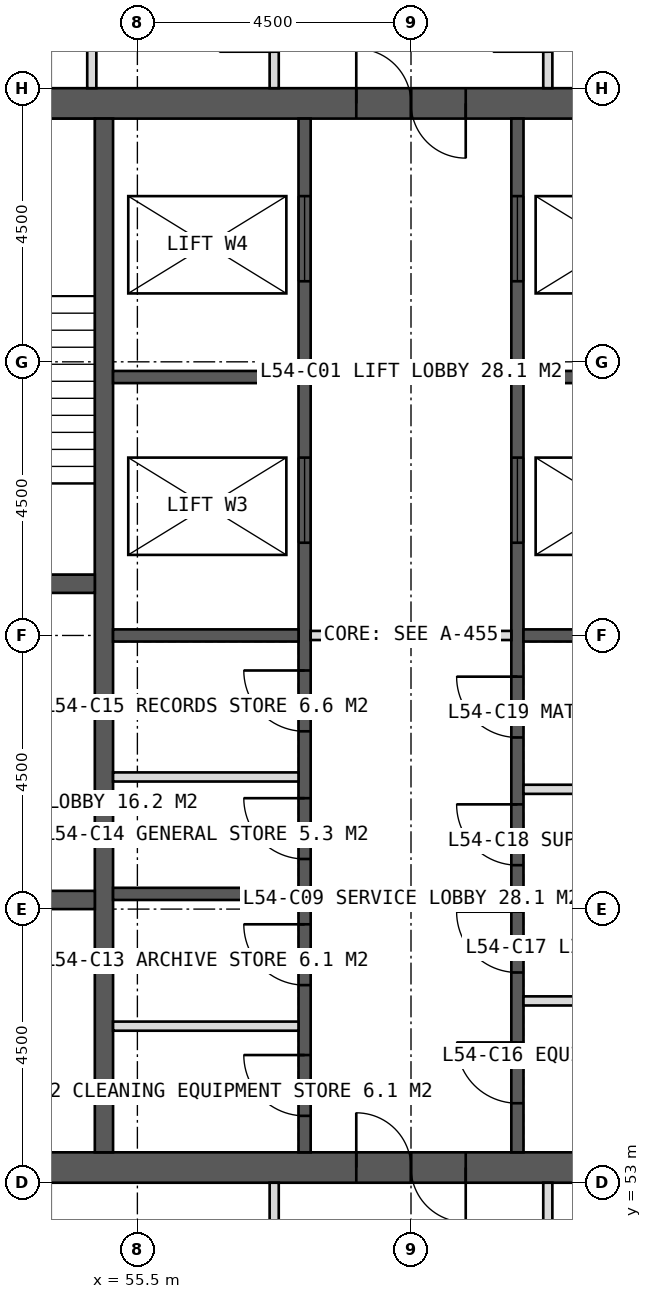
"""IFC4 building model, lengths in metres.
Left out: names, types, materials, properties, quantities, classifications, styles, units other than length and angle.
Written with IfcOpenShell. Run it as: python <this file> out.ifc"""

import sys

from ifc_helpers import new_model, si_unit, direction, frame, frame_2d, origin, place, context, subcontext, project, spatial, rectangle, extrude, element, fill, save


model = new_model("IFC4")
c1 = context("Model", 3, precision=1e-05, world=origin(), true_north=direction((0.0, 1.0)))
c2 = subcontext(c1, "Body", "Model", "MODEL_VIEW")
j1 = project(units=[si_unit("LENGTHUNIT", "METRE"), si_unit("PLANEANGLEUNIT", "RADIAN")], contexts=[c1])
p1 = place(None, origin())
s1 = spatial("IfcSite", under=j1, at=p1, CompositionType="ELEMENT")
p2 = place(p1, origin())
s2 = spatial("IfcBuilding", under=s1, at=p2, CompositionType="ELEMENT")
p3 = place(p2, frame((0.0, 0.0, 225.0)))
s3 = spatial("IfcBuildingStorey", under=s2, at=p3, CompositionType="ELEMENT", Elevation=225.0)
p4 = place(p3, frame((51.0, 70.75, 0.0), z_axis=(0.0, 0.0, 1.0), x_axis=(1.0, 0.0, 0.0)))
e1 = element("IfcWall", 1, at=p4, inside=s3, PredefinedType="SHEAR", context=c2, shape_type="SweptSolid", body=[
    extrude(rectangle(XDim=18.0, YDim=0.5, at=frame_2d((9.0, 0.0))), origin(), (0.0, 0.0, 1.0), 4.0),
])
p5 = place(p4, frame((8.1, 0.0, 0.0)))
e2 = element("IfcOpeningElement", 2, at=p5, cuts=e1, PredefinedType="OPENING", context=c2, shape_type="SweptSolid", body=[
    extrude(rectangle(XDim=1.8, YDim=2.2, at=frame_2d((0.9, 1.1))), frame((0.0, 0.26, 0.0), z_axis=(0.0, -1.0, 0.0), x_axis=(1.0, 0.0, 0.0)), (0.0, 0.0, 1.0), 0.52),
])
p6 = place(p3, frame((51.0, 53.25, 0.0), z_axis=(0.0, 0.0, 1.0), x_axis=(1.0, 0.0, 0.0)))
e3 = element("IfcWall", 3, at=p6, inside=s3, PredefinedType="SHEAR", context=c2, shape_type="SweptSolid", body=[
    extrude(rectangle(XDim=18.0, YDim=0.5, at=frame_2d((9.0, 0.0))), origin(), (0.0, 0.0, 1.0), 4.0),
])
p7 = place(p6, frame((8.1, 0.0, 0.0)))
e4 = element("IfcOpeningElement", 4, at=p7, cuts=e3, PredefinedType="OPENING", context=c2, shape_type="SweptSolid", body=[
    extrude(rectangle(XDim=1.8, YDim=2.2, at=frame_2d((0.9, 1.1))), frame((0.0, 0.26, 0.0), z_axis=(0.0, -1.0, 0.0), x_axis=(1.0, 0.0, 0.0)), (0.0, 0.0, 1.0), 0.52),
])
p8 = place(p3, frame((54.95, 53.5, 0.0), z_axis=(0.0, 0.0, 1.0), x_axis=(0.0, 1.0, 0.0)))
e5 = element("IfcWall", 5, at=p8, inside=s3, PredefinedType="SHEAR", context=c2, shape_type="SweptSolid", body=[
    extrude(rectangle(XDim=17.0, YDim=0.3, at=frame_2d((8.5, 0.0))), origin(), (0.0, 0.0, 1.0), 4.0),
])
p9 = place(p3, frame((58.25, 53.5, 0.0), z_axis=(0.0, 0.0, 1.0), x_axis=(0.0, 1.0, 0.0)))
e6 = element("IfcWall", 6, at=p9, inside=s3, PredefinedType="SHEAR", context=c2, shape_type="SweptSolid", body=[
    extrude(rectangle(XDim=17.0, YDim=0.2, at=frame_2d((8.5, 0.0))), origin(), (0.0, 0.0, 1.0), 4.0),
])
p10 = place(p9, frame((0.6, 0.0, 0.0)))
e7 = element("IfcOpeningElement", 7, at=p10, cuts=e6, PredefinedType="OPENING", context=c2, shape_type="SweptSolid", body=[
    extrude(rectangle(XDim=1.0, YDim=2.1, at=frame_2d((0.5, 1.05))), frame((0.0, 0.11, 0.0), z_axis=(0.0, -1.0, 0.0), x_axis=(1.0, 0.0, 0.0)), (0.0, 0.0, 1.0), 0.22),
])
p11 = place(p9, frame((2.75, 0.0, 0.0)))
e8 = element("IfcOpeningElement", 8, at=p11, cuts=e6, PredefinedType="OPENING", context=c2, shape_type="SweptSolid", body=[
    extrude(rectangle(XDim=1.0, YDim=2.1, at=frame_2d((0.5, 1.05))), frame((0.0, 0.11, 0.0), z_axis=(0.0, -1.0, 0.0), x_axis=(1.0, 0.0, 0.0)), (0.0, 0.0, 1.0), 0.22),
])
p12 = place(p9, frame((4.824, 0.0, 0.0)))
e9 = element("IfcOpeningElement", 9, at=p12, cuts=e6, PredefinedType="OPENING", context=c2, shape_type="SweptSolid", body=[
    extrude(rectangle(XDim=1.0, YDim=2.1, at=frame_2d((0.5, 1.05))), frame((0.0, 0.11, 0.0), z_axis=(0.0, -1.0, 0.0), x_axis=(1.0, 0.0, 0.0)), (0.0, 0.0, 1.0), 0.22),
])
p13 = place(p9, frame((6.924, 0.0, 0.0)))
e10 = element("IfcOpeningElement", 10, at=p13, cuts=e6, PredefinedType="OPENING", context=c2, shape_type="SweptSolid", body=[
    extrude(rectangle(XDim=1.0, YDim=2.1, at=frame_2d((0.5, 1.05))), frame((0.0, 0.11, 0.0), z_axis=(0.0, -1.0, 0.0), x_axis=(1.0, 0.0, 0.0)), (0.0, 0.0, 1.0), 0.22),
])
p14 = place(p9, frame((10.025, 0.0, 0.0)))
e11 = element("IfcOpeningElement", 11, at=p14, cuts=e6, PredefinedType="OPENING", context=c2, shape_type="SweptSolid", body=[
    extrude(rectangle(XDim=1.4, YDim=2.2, at=frame_2d((0.7, 1.1))), frame((0.0, 0.11, 0.0), z_axis=(0.0, -1.0, 0.0), x_axis=(1.0, 0.0, 0.0)), (0.0, 0.0, 1.0), 0.22),
])
p15 = place(p9, frame((14.325, 0.0, 0.0)))
e12 = element("IfcOpeningElement", 12, at=p15, cuts=e6, PredefinedType="OPENING", context=c2, shape_type="SweptSolid", body=[
    extrude(rectangle(XDim=1.4, YDim=2.2, at=frame_2d((0.7, 1.1))), frame((0.0, 0.11, 0.0), z_axis=(0.0, -1.0, 0.0), x_axis=(1.0, 0.0, 0.0)), (0.0, 0.0, 1.0), 0.22),
])
p16 = place(p3, frame((61.75, 53.5, 0.0), z_axis=(0.0, 0.0, 1.0), x_axis=(0.0, 1.0, 0.0)))
e13 = element("IfcWall", 13, at=p16, inside=s3, PredefinedType="SHEAR", context=c2, shape_type="SweptSolid", body=[
    extrude(rectangle(XDim=17.0, YDim=0.2, at=frame_2d((8.5, 0.0))), origin(), (0.0, 0.0, 1.0), 4.0),
])
p17 = place(p16, frame((0.808, 0.0, 0.0)))
e14 = element("IfcOpeningElement", 14, at=p17, cuts=e13, PredefinedType="OPENING", context=c2, shape_type="SweptSolid", body=[
    extrude(rectangle(XDim=1.0, YDim=2.1, at=frame_2d((0.5, 1.05))), frame((0.0, 0.11, 0.0), z_axis=(0.0, -1.0, 0.0), x_axis=(1.0, 0.0, 0.0)), (0.0, 0.0, 1.0), 0.22),
])
p18 = place(p16, frame((2.958, 0.0, 0.0)))
e15 = element("IfcOpeningElement", 15, at=p18, cuts=e13, PredefinedType="OPENING", context=c2, shape_type="SweptSolid", body=[
    extrude(rectangle(XDim=1.0, YDim=2.1, at=frame_2d((0.5, 1.05))), frame((0.0, 0.11, 0.0), z_axis=(0.0, -1.0, 0.0), x_axis=(1.0, 0.0, 0.0)), (0.0, 0.0, 1.0), 0.22),
])
p19 = place(p16, frame((4.722, 0.0, 0.0)))
e16 = element("IfcOpeningElement", 16, at=p19, cuts=e13, PredefinedType="OPENING", context=c2, shape_type="SweptSolid", body=[
    extrude(rectangle(XDim=1.0, YDim=2.1, at=frame_2d((0.5, 1.05))), frame((0.0, 0.11, 0.0), z_axis=(0.0, -1.0, 0.0), x_axis=(1.0, 0.0, 0.0)), (0.0, 0.0, 1.0), 0.22),
])
p20 = place(p16, frame((6.823, 0.0, 0.0)))
e17 = element("IfcOpeningElement", 17, at=p20, cuts=e13, PredefinedType="OPENING", context=c2, shape_type="SweptSolid", body=[
    extrude(rectangle(XDim=1.0, YDim=2.1, at=frame_2d((0.5, 1.05))), frame((0.0, 0.11, 0.0), z_axis=(0.0, -1.0, 0.0), x_axis=(1.0, 0.0, 0.0)), (0.0, 0.0, 1.0), 0.22),
])
p21 = place(p16, frame((10.025, 0.0, 0.0)))
e18 = element("IfcOpeningElement", 18, at=p21, cuts=e13, PredefinedType="OPENING", context=c2, shape_type="SweptSolid", body=[
    extrude(rectangle(XDim=1.4, YDim=2.2, at=frame_2d((0.7, 1.1))), frame((0.0, 0.11, 0.0), z_axis=(0.0, -1.0, 0.0), x_axis=(1.0, 0.0, 0.0)), (0.0, 0.0, 1.0), 0.22),
])
p22 = place(p16, frame((14.325, 0.0, 0.0)))
e19 = element("IfcOpeningElement", 19, at=p22, cuts=e13, PredefinedType="OPENING", context=c2, shape_type="SweptSolid", body=[
    extrude(rectangle(XDim=1.4, YDim=2.2, at=frame_2d((0.7, 1.1))), frame((0.0, 0.11, 0.0), z_axis=(0.0, -1.0, 0.0), x_axis=(1.0, 0.0, 0.0)), (0.0, 0.0, 1.0), 0.22),
])
for number, where, z_axis, x_axis in (
    (20, (55.1, 57.75, 0.0), (0.0, 0.0, 1.0), (1.0, 0.0, 0.0)),
    (21, (61.85, 57.75, 0.0), (0.0, 0.0, 1.0), (1.0, 0.0, 0.0)),
    (22, (55.1, 62.0, 0.0), (0.0, 0.0, 1.0), (1.0, 0.0, 0.0)),
    (23, (61.85, 62.0, 0.0), (0.0, 0.0, 1.0), (1.0, 0.0, 0.0)),
    (24, (55.1, 66.25, 0.0), (0.0, 0.0, 1.0), (1.0, 0.0, 0.0)),
    (25, (61.85, 66.25, 0.0), (0.0, 0.0, 1.0), (1.0, 0.0, 0.0)),
):
    element("IfcWall", number, at=place(p3, frame(where, z_axis=z_axis, x_axis=x_axis)), inside=s3, PredefinedType="SHEAR", context=c2, shape_type="SweptSolid", body=[
        extrude(rectangle(XDim=3.05, YDim=0.2, at=frame_2d((1.525, 0.0))), origin(), (0.0, 0.0, 1.0), 4.0),
    ])
p23 = place(p3, frame((51.5, 62.85, 0.0), z_axis=(0.0, 0.0, 1.0), x_axis=(1.0, 0.0, 0.0)))
e26 = element("IfcWall", 26, at=p23, inside=s3, PredefinedType="SHEAR", context=c2, shape_type="SweptSolid", body=[
    extrude(rectangle(XDim=3.3, YDim=0.3, at=frame_2d((1.65, 0.0))), origin(), (0.0, 0.0, 1.0), 4.0),
])
p24 = place(p23, frame((1.15, 0.0, 0.0)))
e27 = element("IfcOpeningElement", 27, at=p24, cuts=e26, PredefinedType="OPENING", context=c2, shape_type="SweptSolid", body=[
    extrude(rectangle(XDim=1.2, YDim=2.1, at=frame_2d((0.6, 1.05))), frame((0.0, 0.16, 0.0), z_axis=(0.0, -1.0, 0.0), x_axis=(1.0, 0.0, 0.0)), (0.0, 0.0, 1.0), 0.32),
])
p25 = place(p3, frame((51.5, 57.65, 0.0), z_axis=(0.0, 0.0, 1.0), x_axis=(1.0, 0.0, 0.0)))
e28 = element("IfcWall", 28, at=p25, inside=s3, PredefinedType="SHEAR", context=c2, shape_type="SweptSolid", body=[
    extrude(rectangle(XDim=3.3, YDim=0.3, at=frame_2d((1.65, 0.0))), origin(), (0.0, 0.0, 1.0), 4.0),
])
p26 = place(p25, frame((1.15, 0.0, 0.0)))
e29 = element("IfcOpeningElement", 29, at=p26, cuts=e28, PredefinedType="OPENING", context=c2, shape_type="SweptSolid", body=[
    extrude(rectangle(XDim=1.2, YDim=2.2, at=frame_2d((0.6, 1.1))), frame((0.0, 0.16, 0.0), z_axis=(0.0, -1.0, 0.0), x_axis=(1.0, 0.0, 0.0)), (0.0, 0.0, 1.0), 0.32),
])
p27 = place(p3, frame((57.75, 71.0, 0.0), z_axis=(0.0, 0.0, 1.0), x_axis=(0.0, 1.0, 0.0)))
e30 = element("IfcWall", 30, at=p27, inside=s3, PredefinedType="PARTITIONING", context=c2, shape_type="SweptSolid", body=[
    extrude(rectangle(XDim=3.9, YDim=0.15, at=frame_2d((1.95, 0.0))), origin(), (0.0, 0.0, 1.0), 3.75),
])
p28 = place(p27, frame((0.6, 0.0, 0.0)))
e31 = element("IfcOpeningElement", 31, at=p28, cuts=e30, PredefinedType="OPENING", context=c2, shape_type="SweptSolid", body=[
    extrude(rectangle(XDim=0.9, YDim=2.1, at=frame_2d((0.45, 1.05))), frame((0.0, 0.085, 0.0), z_axis=(0.0, -1.0, 0.0), x_axis=(1.0, 0.0, 0.0)), (0.0, 0.0, 1.0), 0.17),
])
p29 = place(p3, frame((62.25, 71.0, 0.0), z_axis=(0.0, 0.0, 1.0), x_axis=(0.0, 1.0, 0.0)))
e32 = element("IfcWall", 32, at=p29, inside=s3, PredefinedType="PARTITIONING", context=c2, shape_type="SweptSolid", body=[
    extrude(rectangle(XDim=3.9, YDim=0.15, at=frame_2d((1.95, 0.0))), origin(), (0.0, 0.0, 1.0), 3.75),
])
p30 = place(p29, frame((0.6, 0.0, 0.0)))
e33 = element("IfcOpeningElement", 33, at=p30, cuts=e32, PredefinedType="OPENING", context=c2, shape_type="SweptSolid", body=[
    extrude(rectangle(XDim=0.9, YDim=2.1, at=frame_2d((0.45, 1.05))), frame((0.0, 0.085, 0.0), z_axis=(0.0, -1.0, 0.0), x_axis=(1.0, 0.0, 0.0)), (0.0, 0.0, 1.0), 0.17),
])
p31 = place(p3, frame((54.75, 71.0, 0.0), z_axis=(0.0, 0.0, 1.0), x_axis=(0.0, 1.0, 0.0)))
e34 = element("IfcWall", 34, at=p31, inside=s3, PredefinedType="PARTITIONING", context=c2, shape_type="SweptSolid", body=[
    extrude(rectangle(XDim=2.4, YDim=0.15, at=frame_2d((1.2, 0.0))), origin(), (0.0, 0.0, 1.0), 3.75),
])
for number, where, z_axis, x_axis in (
    (35, (62.25, 53.0, 0.0), (0.0, 0.0, 1.0), (0.0, -1.0, 0.0)),
    (36, (57.75, 53.0, 0.0), (0.0, 0.0, 1.0), (0.0, -1.0, 0.0)),
):
    element("IfcWall", number, at=place(p3, frame(where, z_axis=z_axis, x_axis=x_axis)), inside=s3, PredefinedType="PARTITIONING", context=c2, shape_type="SweptSolid", body=[
        extrude(rectangle(XDim=3.9, YDim=0.15, at=frame_2d((1.95, 0.0))), origin(), (0.0, 0.0, 1.0), 3.75),
    ])
for number, where, z_axis, x_axis in (
    (37, (55.1, 55.575, 0.0), (0.0, 0.0, 1.0), (1.0, 0.0, 0.0)),
    (38, (61.85, 55.99, 0.0), (0.0, 0.0, 1.0), (1.0, 0.0, 0.0)),
    (39, (55.1, 59.673, 0.0), (0.0, 0.0, 1.0), (1.0, 0.0, 0.0)),
    (40, (61.85, 59.47, 0.0), (0.0, 0.0, 1.0), (1.0, 0.0, 0.0)),
):
    element("IfcWall", number, at=place(p3, frame(where, z_axis=z_axis, x_axis=x_axis)), inside=s3, PredefinedType="PARTITIONING", context=c2, shape_type="SweptSolid", body=[
        extrude(rectangle(XDim=3.05, YDim=0.15, at=frame_2d((1.525, 0.0))), origin(), (0.0, 0.0, 1.0), 3.75),
    ])
p32 = place(p3, frame((58.35, 62.0, 0.0), z_axis=(0.0, 0.0, 1.0), x_axis=(1.0, 0.0, 0.0)))
e41 = element("IfcWall", 41, at=p32, inside=s3, PredefinedType="PARTITIONING", context=c2, shape_type="SweptSolid", body=[
    extrude(rectangle(XDim=3.3, YDim=0.15, at=frame_2d((1.65, 0.0))), origin(), (0.0, 0.0, 1.0), 3.75),
])
p33 = place(p5, origin())
e42 = element("IfcDoor", 42, at=p33, inside=s3, OperationType="DOUBLE_DOOR_SINGLE_SWING", PredefinedType="DOOR", context=c2, shape_type="SweptSolid", body=[
    extrude(rectangle(XDim=1.8, YDim=2.2, at=frame_2d((0.9, 1.1))), frame((0.0, 0.025, 0.0), z_axis=(0.0, -1.0, 0.0), x_axis=(1.0, 0.0, 0.0)), (0.0, 0.0, 1.0), 0.05),
])
fill(e2, e42)
p34 = place(p10, origin())
e43 = element("IfcDoor", 43, at=p34, inside=s3, OperationType="SINGLE_SWING_RIGHT", PredefinedType="DOOR", context=c2, shape_type="SweptSolid", body=[
    extrude(rectangle(XDim=1.0, YDim=2.1, at=frame_2d((0.5, 1.05))), frame((0.0, 0.025, 0.0), z_axis=(0.0, -1.0, 0.0), x_axis=(1.0, 0.0, 0.0)), (0.0, 0.0, 1.0), 0.05),
])
fill(e7, e43)
p35 = place(p11, origin())
e44 = element("IfcDoor", 44, at=p35, inside=s3, OperationType="SINGLE_SWING_RIGHT", PredefinedType="DOOR", context=c2, shape_type="SweptSolid", body=[
    extrude(rectangle(XDim=1.0, YDim=2.1, at=frame_2d((0.5, 1.05))), frame((0.0, 0.025, 0.0), z_axis=(0.0, -1.0, 0.0), x_axis=(1.0, 0.0, 0.0)), (0.0, 0.0, 1.0), 0.05),
])
fill(e8, e44)
p36 = place(p17, origin())
e45 = element("IfcDoor", 45, at=p36, inside=s3, OperationType="SINGLE_SWING_RIGHT", PredefinedType="DOOR", context=c2, shape_type="SweptSolid", body=[
    extrude(rectangle(XDim=1.0, YDim=2.1, at=frame_2d((0.5, 1.05))), frame((0.0, 0.025, 0.0), z_axis=(0.0, -1.0, 0.0), x_axis=(1.0, 0.0, 0.0)), (0.0, 0.0, 1.0), 0.05),
])
fill(e14, e45)
p37 = place(p18, origin())
e46 = element("IfcDoor", 46, at=p37, inside=s3, OperationType="SINGLE_SWING_RIGHT", PredefinedType="DOOR", context=c2, shape_type="SweptSolid", body=[
    extrude(rectangle(XDim=1.0, YDim=2.1, at=frame_2d((0.5, 1.05))), frame((0.0, 0.025, 0.0), z_axis=(0.0, -1.0, 0.0), x_axis=(1.0, 0.0, 0.0)), (0.0, 0.0, 1.0), 0.05),
])
fill(e15, e46)
p38 = place(p12, origin())
e47 = element("IfcDoor", 47, at=p38, inside=s3, OperationType="SINGLE_SWING_RIGHT", PredefinedType="DOOR", context=c2, shape_type="SweptSolid", body=[
    extrude(rectangle(XDim=1.0, YDim=2.1, at=frame_2d((0.5, 1.05))), frame((0.0, 0.025, 0.0), z_axis=(0.0, -1.0, 0.0), x_axis=(1.0, 0.0, 0.0)), (0.0, 0.0, 1.0), 0.05),
])
fill(e9, e47)
p39 = place(p13, origin())
e48 = element("IfcDoor", 48, at=p39, inside=s3, OperationType="SINGLE_SWING_RIGHT", PredefinedType="DOOR", context=c2, shape_type="SweptSolid", body=[
    extrude(rectangle(XDim=1.0, YDim=2.1, at=frame_2d((0.5, 1.05))), frame((0.0, 0.025, 0.0), z_axis=(0.0, -1.0, 0.0), x_axis=(1.0, 0.0, 0.0)), (0.0, 0.0, 1.0), 0.05),
])
fill(e10, e48)
p40 = place(p19, origin())
e49 = element("IfcDoor", 49, at=p40, inside=s3, OperationType="SINGLE_SWING_RIGHT", PredefinedType="DOOR", context=c2, shape_type="SweptSolid", body=[
    extrude(rectangle(XDim=1.0, YDim=2.1, at=frame_2d((0.5, 1.05))), frame((0.0, 0.025, 0.0), z_axis=(0.0, -1.0, 0.0), x_axis=(1.0, 0.0, 0.0)), (0.0, 0.0, 1.0), 0.05),
])
fill(e16, e49)
p41 = place(p20, origin())
e50 = element("IfcDoor", 50, at=p41, inside=s3, OperationType="SINGLE_SWING_RIGHT", PredefinedType="DOOR", context=c2, shape_type="SweptSolid", body=[
    extrude(rectangle(XDim=1.0, YDim=2.1, at=frame_2d((0.5, 1.05))), frame((0.0, 0.025, 0.0), z_axis=(0.0, -1.0, 0.0), x_axis=(1.0, 0.0, 0.0)), (0.0, 0.0, 1.0), 0.05),
])
fill(e17, e50)
p42 = place(p14, origin())
e51 = element("IfcDoor", 51, at=p42, inside=s3, OperationType="SLIDING_TO_LEFT", PredefinedType="DOOR", context=c2, shape_type="SweptSolid", body=[
    extrude(rectangle(XDim=1.4, YDim=2.2, at=frame_2d((0.7, 1.1))), frame((0.0, 0.025, 0.0), z_axis=(0.0, -1.0, 0.0), x_axis=(1.0, 0.0, 0.0)), (0.0, 0.0, 1.0), 0.05),
])
fill(e11, e51)
p43 = place(p21, origin())
e52 = element("IfcDoor", 52, at=p43, inside=s3, OperationType="SLIDING_TO_LEFT", PredefinedType="DOOR", context=c2, shape_type="SweptSolid", body=[
    extrude(rectangle(XDim=1.4, YDim=2.2, at=frame_2d((0.7, 1.1))), frame((0.0, 0.025, 0.0), z_axis=(0.0, -1.0, 0.0), x_axis=(1.0, 0.0, 0.0)), (0.0, 0.0, 1.0), 0.05),
])
fill(e18, e52)
p44 = place(p15, origin())
e53 = element("IfcDoor", 53, at=p44, inside=s3, OperationType="SLIDING_TO_LEFT", PredefinedType="DOOR", context=c2, shape_type="SweptSolid", body=[
    extrude(rectangle(XDim=1.4, YDim=2.2, at=frame_2d((0.7, 1.1))), frame((0.0, 0.025, 0.0), z_axis=(0.0, -1.0, 0.0), x_axis=(1.0, 0.0, 0.0)), (0.0, 0.0, 1.0), 0.05),
])
fill(e12, e53)
p45 = place(p22, origin())
e54 = element("IfcDoor", 54, at=p45, inside=s3, OperationType="SLIDING_TO_LEFT", PredefinedType="DOOR", context=c2, shape_type="SweptSolid", body=[
    extrude(rectangle(XDim=1.4, YDim=2.2, at=frame_2d((0.7, 1.1))), frame((0.0, 0.025, 0.0), z_axis=(0.0, -1.0, 0.0), x_axis=(1.0, 0.0, 0.0)), (0.0, 0.0, 1.0), 0.05),
])
fill(e19, e54)
p46 = place(p7, origin())
e55 = element("IfcDoor", 55, at=p46, inside=s3, OperationType="DOUBLE_DOOR_SINGLE_SWING", PredefinedType="DOOR", context=c2, shape_type="SweptSolid", body=[
    extrude(rectangle(XDim=1.8, YDim=2.2, at=frame_2d((0.9, 1.1))), frame((0.0, 0.025, 0.0), z_axis=(0.0, -1.0, 0.0), x_axis=(1.0, 0.0, 0.0)), (0.0, 0.0, 1.0), 0.05),
])
fill(e4, e55)
save(model, sys.argv[1])
